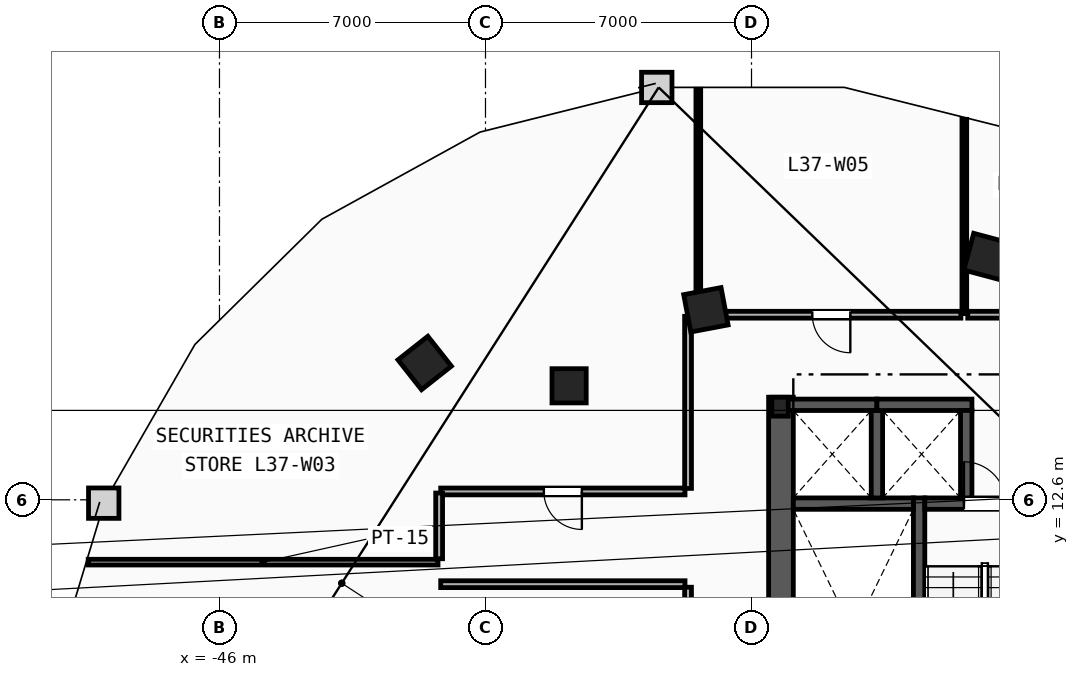
"""IFC4 building model, lengths in metres.
Left out: names, types, materials, properties, quantities, classifications, styles, units other than length and angle.
Written with IfcOpenShell. Run it as: python <this file> out.ifc"""

import sys

from ifc_helpers import new_model, si_unit, direction, frame, frame_2d, origin, origin_2d, place, context, subcontext, project, spatial, rectangle, i_section, extrude, element, fill, save


model = new_model("IFC4")
c1 = context("Model", 3, precision=1e-05, world=origin(), true_north=direction((0.0, 1.0)))
c2 = subcontext(c1, "Body", "Model", "MODEL_VIEW")
j1 = project(units=[si_unit("LENGTHUNIT", "METRE"), si_unit("PLANEANGLEUNIT", "RADIAN")], contexts=[c1])
p1 = place(None, origin())
s1 = spatial("IfcSite", under=j1, at=p1, CompositionType="ELEMENT")
p2 = place(p1, origin())
s2 = spatial("IfcBuilding", under=s1, at=p2, CompositionType="ELEMENT")
p3 = place(p2, frame((0.0, 0.0, 144.0)))
s3 = spatial("IfcBuildingStorey", under=s2, at=p3, CompositionType="ELEMENT", Elevation=144.0)
p4 = place(p3, frame((-31.25, 15.05, 0.0), z_axis=(0.0, 0.0, 1.0), x_axis=(1.0, 0.0, 0.0)))
e1 = element("IfcColumn", 1, at=p4, inside=s3, PredefinedType="COLUMN", context=c2, shape_type="SweptSolid", body=[
    extrude(i_section(OverallWidth=0.432, OverallDepth=0.498, WebThickness=0.056, FlangeThickness=0.089, FilletRadius=0.018, at=origin_2d()), origin(), (0.0, 0.0, 1.0), 3.6),
])
p5 = place(p3, frame((-36.8, 15.6, 0.0), z_axis=(0.0, 0.0, 1.0), x_axis=(1.0, 0.0, 0.0)))
e2 = element("IfcColumn", 2, at=p5, inside=s3, PredefinedType="COLUMN", context=c2, shape_type="SweptSolid", body=[
    extrude(rectangle(XDim=0.9, YDim=0.9, at=origin_2d()), origin(), (0.0, 0.0, 1.0), 3.6),
])
for number, where, z_axis, x_axis in (
    (3, (-25.8, 19.0, 0.0), (0.0, 0.0, 1.0), (-0.966, 0.259, 0.0)),
    (4, (-33.2, 17.6, 0.0), (0.0, 0.0, 1.0), (-0.983, -0.186, 0.0)),
    (5, (-40.6, 16.2, 0.0), (0.0, 0.0, 1.0), (-0.785, -0.619, 0.0)),
):
    element("IfcColumn", number, at=place(p3, frame(where, z_axis=z_axis, x_axis=x_axis)), inside=s3, PredefinedType="COLUMN", context=c2, shape_type="SweptSolid", body=[
        extrude(rectangle(XDim=1.0, YDim=1.0, at=origin_2d()), origin(), (0.0, 0.0, 1.0), 3.6),
    ])
p6 = place(p3, frame((-31.225, 1.97, 0.0), z_axis=(0.0, 0.0, 1.0), x_axis=(0.0, 1.0, 0.0)))
e6 = element("IfcWall", 6, at=p6, inside=s3, PredefinedType="SHEAR", context=c2, shape_type="SweptSolid", body=[
    extrude(rectangle(XDim=13.33, YDim=0.65, at=frame_2d((6.665, 0.0))), origin(), (0.0, 0.0, 1.0), 3.36),
])
p7 = place(p3, frame((-27.59, 1.97, 0.0), z_axis=(0.0, 0.0, 1.0), x_axis=(0.0, 1.0, 0.0)))
e7 = element("IfcWall", 7, at=p7, inside=s3, PredefinedType="SHEAR", context=c2, shape_type="SweptSolid", body=[
    extrude(rectangle(XDim=10.68, YDim=0.3, at=frame_2d((5.34, 0.0))), origin(), (0.0, 0.0, 1.0), 3.36),
])
p8 = place(p3, frame((-30.9, 12.5, 0.0), z_axis=(0.0, 0.0, 1.0), x_axis=(1.0, 0.0, 0.0)))
e8 = element("IfcWall", 8, at=p8, inside=s3, PredefinedType="SHEAR", context=c2, shape_type="SweptSolid", body=[
    extrude(rectangle(XDim=3.16, YDim=0.3, at=frame_2d((1.58, 0.0))), origin(), (0.0, 0.0, 1.0), 3.36),
])
p9 = place(p3, frame((-27.44, 12.5, 0.0), z_axis=(0.0, 0.0, 1.0), x_axis=(1.0, 0.0, 0.0)))
e9 = element("IfcWall", 9, at=p9, inside=s3, PredefinedType="SHEAR", context=c2, shape_type="SweptSolid", body=[
    extrude(rectangle(XDim=3.16, YDim=0.3, at=frame_2d((1.58, 0.0))), origin(), (0.0, 0.0, 1.0), 3.36),
])
p10 = place(p9, frame((1.03, 0.0, 0.0)))
e10 = element("IfcOpeningElement", 10, at=p10, cuts=e9, PredefinedType="OPENING", context=c2, shape_type="SweptSolid", body=[
    extrude(rectangle(XDim=1.1, YDim=2.15, at=frame_2d((0.55, 1.075))), frame((0.0, 0.16, 0.0), z_axis=(0.0, -1.0, 0.0), x_axis=(1.0, 0.0, 0.0)), (0.0, 0.0, 1.0), 0.32),
])
p11 = place(p3, frame((-31.2, 15.1, 0.0), z_axis=(0.0, 0.0, 1.0), x_axis=(1.0, 0.0, 0.0)))
e11 = element("IfcWall", 11, at=p11, inside=s3, PredefinedType="SHEAR", context=c2, shape_type="SweptSolid", body=[
    extrude(rectangle(XDim=2.5, YDim=0.3, at=frame_2d((1.25, 0.0))), origin(), (0.0, 0.0, 1.0), 3.36),
])
p12 = place(p3, frame((-28.7, 12.65, 0.0), z_axis=(0.0, 0.0, 1.0), x_axis=(0.0, 1.0, 0.0)))
e12 = element("IfcWall", 12, at=p12, inside=s3, PredefinedType="SHEAR", context=c2, shape_type="SweptSolid", body=[
    extrude(rectangle(XDim=2.3, YDim=0.3, at=frame_2d((1.15, 0.0))), origin(), (0.0, 0.0, 1.0), 3.36),
])
p13 = place(p3, frame((-28.7, 15.1, 0.0), z_axis=(0.0, 0.0, 1.0), x_axis=(1.0, 0.0, 0.0)))
e13 = element("IfcWall", 13, at=p13, inside=s3, PredefinedType="SHEAR", context=c2, shape_type="SweptSolid", body=[
    extrude(rectangle(XDim=2.5, YDim=0.3, at=frame_2d((1.25, 0.0))), origin(), (0.0, 0.0, 1.0), 3.36),
])
p14 = place(p3, frame((-26.35, 12.65, 0.0), z_axis=(0.0, 0.0, 1.0), x_axis=(0.0, 1.0, 0.0)))
e14 = element("IfcWall", 14, at=p14, inside=s3, PredefinedType="SHEAR", context=c2, shape_type="SweptSolid", body=[
    extrude(rectangle(XDim=2.3, YDim=0.3, at=frame_2d((1.15, 0.0))), origin(), (0.0, 0.0, 1.0), 3.36),
])
p15 = place(p3, frame((-49.454, 10.96, 0.0), z_axis=(0.0, 0.0, 1.0), x_axis=(1.0, 0.0, 0.0)))
e15 = element("IfcWall", 15, at=p15, inside=s3, PredefinedType="PARTITIONING", context=c2, shape_type="SweptSolid", body=[
    extrude(rectangle(XDim=9.204, YDim=0.15, at=frame_2d((4.602, 0.0))), origin(), (0.0, 0.0, 1.0), 3.36),
])
p16 = place(p3, frame((-33.4, 17.5, 0.0), z_axis=(0.0, 0.0, 1.0), x_axis=(0.0, 1.0, 0.0)))
e16 = element("IfcWall", 16, at=p16, inside=s3, PredefinedType="PARTITIONING", context=c2, shape_type="SweptSolid", body=[
    extrude(rectangle(XDim=5.902, YDim=0.125, at=frame_2d((2.951, 0.0))), origin(), (0.0, 0.0, 1.0), 3.36),
])
p17 = place(p3, frame((-26.4, 17.5, 0.0), z_axis=(0.0, 0.0, 1.0), x_axis=(0.0, 1.0, 0.0)))
e17 = element("IfcWall", 17, at=p17, inside=s3, PredefinedType="PARTITIONING", context=c2, shape_type="SweptSolid", body=[
    extrude(rectangle(XDim=5.111, YDim=0.125, at=frame_2d((2.556, 0.0))), origin(), (0.0, 0.0, 1.0), 3.36),
])
p18 = place(p3, frame((-40.178, 10.38, 0.0), z_axis=(0.0, 0.0, 1.0), x_axis=(1.0, 0.0, 0.0)))
e18 = element("IfcWall", 18, at=p18, inside=s3, PredefinedType="PARTITIONING", context=c2, shape_type="SweptSolid", body=[
    extrude(rectangle(XDim=6.428, YDim=0.18, at=frame_2d((3.214, 0.0))), origin(), (0.0, 0.0, 1.0), 3.36),
])
p19 = place(p3, frame((-33.67, 10.3, 0.0), z_axis=(0.0, 0.0, 1.0), x_axis=(0.0, -1.0, 0.0)))
e19 = element("IfcWall", 19, at=p19, inside=s3, PredefinedType="PARTITIONING", context=c2, shape_type="SweptSolid", body=[
    extrude(rectangle(XDim=1.299, YDim=0.18, at=frame_2d((0.649, 0.0))), origin(), (0.0, 0.0, 1.0), 3.36),
])
p20 = place(p3, frame((-33.75, 12.82, 0.0), z_axis=(0.0, 0.0, 1.0), x_axis=(-1.0, 0.0, 0.0)))
e20 = element("IfcWall", 20, at=p20, inside=s3, PredefinedType="PARTITIONING", context=c2, shape_type="SweptSolid", body=[
    extrude(rectangle(XDim=6.428, YDim=0.18, at=frame_2d((3.214, 0.0))), origin(), (0.0, 0.0, 1.0), 3.36),
])
p21 = place(p20, frame((2.714, 0.0, 0.0)))
e21 = element("IfcOpeningElement", 21, at=p21, cuts=e20, PredefinedType="OPENING", context=c2, shape_type="SweptSolid", body=[
    extrude(rectangle(XDim=1.0, YDim=2.15, at=frame_2d((0.5, 1.075))), frame((0.0, 0.1, 0.0), z_axis=(0.0, -1.0, 0.0), x_axis=(1.0, 0.0, 0.0)), (0.0, 0.0, 1.0), 0.2),
])
p22 = place(p3, frame((-33.67, 17.428, 0.0), z_axis=(0.0, 0.0, 1.0), x_axis=(0.0, -1.0, 0.0)))
e22 = element("IfcWall", 22, at=p22, inside=s3, PredefinedType="PARTITIONING", context=c2, shape_type="SweptSolid", body=[
    extrude(rectangle(XDim=4.529, YDim=0.18, at=frame_2d((2.264, 0.0))), origin(), (0.0, 0.0, 1.0), 3.36),
])
p23 = place(p3, frame((-40.22, 12.779, 0.0), z_axis=(0.0, 0.0, 1.0), x_axis=(0.0, -1.0, 0.0)))
e23 = element("IfcWall", 23, at=p23, inside=s3, PredefinedType="PARTITIONING", context=c2, shape_type="SweptSolid", body=[
    extrude(rectangle(XDim=1.729, YDim=0.18, at=frame_2d((0.864, 0.0))), origin(), (0.0, 0.0, 1.0), 3.36),
])
p24 = place(p3, frame((-18.342, 17.47, 0.0), z_axis=(0.0, 0.0, 1.0), x_axis=(-1.0, 0.0, 0.0)))
e24 = element("IfcWall", 24, at=p24, inside=s3, PredefinedType="PARTITIONING", context=c2, shape_type="SweptSolid", body=[
    extrude(rectangle(XDim=7.968, YDim=0.18, at=frame_2d((3.984, 0.0))), origin(), (0.0, 0.0, 1.0), 3.36),
])
p25 = place(p24, frame((3.484, 0.0, 0.0)))
e25 = element("IfcOpeningElement", 25, at=p25, cuts=e24, PredefinedType="OPENING", context=c2, shape_type="SweptSolid", body=[
    extrude(rectangle(XDim=1.0, YDim=2.15, at=frame_2d((0.5, 1.075))), frame((0.0, 0.1, 0.0), z_axis=(0.0, -1.0, 0.0), x_axis=(1.0, 0.0, 0.0)), (0.0, 0.0, 1.0), 0.2),
])
p26 = place(p3, frame((-26.49, 17.47, 0.0), z_axis=(0.0, 0.0, 1.0), x_axis=(-1.0, 0.0, 0.0)))
e26 = element("IfcWall", 26, at=p26, inside=s3, PredefinedType="PARTITIONING", context=c2, shape_type="SweptSolid", body=[
    extrude(rectangle(XDim=6.82, YDim=0.18, at=frame_2d((3.41, 0.0))), origin(), (0.0, 0.0, 1.0), 3.36),
])
p27 = place(p26, frame((2.91, 0.0, 0.0)))
e27 = element("IfcOpeningElement", 27, at=p27, cuts=e26, PredefinedType="OPENING", context=c2, shape_type="SweptSolid", body=[
    extrude(rectangle(XDim=1.0, YDim=2.15, at=frame_2d((0.5, 1.075))), frame((0.0, 0.1, 0.0), z_axis=(0.0, -1.0, 0.0), x_axis=(1.0, 0.0, 0.0)), (0.0, 0.0, 1.0), 0.2),
])
p28 = place(p10, origin())
e28 = element("IfcDoor", 28, at=p28, inside=s3, OperationType="SINGLE_SWING_LEFT", PredefinedType="DOOR", context=c2, shape_type="SweptSolid", body=[
    extrude(rectangle(XDim=1.1, YDim=2.15, at=frame_2d((0.55, 1.075))), frame((0.0, 0.025, 0.0), z_axis=(0.0, -1.0, 0.0), x_axis=(1.0, 0.0, 0.0)), (0.0, 0.0, 1.0), 0.05),
])
fill(e10, e28)
p29 = place(p27, origin())
e29 = element("IfcDoor", 29, at=p29, inside=s3, OperationType="SINGLE_SWING_LEFT", PredefinedType="DOOR", context=c2, shape_type="SweptSolid", body=[
    extrude(rectangle(XDim=1.0, YDim=2.15, at=frame_2d((0.5, 1.075))), frame((0.0, 0.025, 0.0), z_axis=(0.0, -1.0, 0.0), x_axis=(1.0, 0.0, 0.0)), (0.0, 0.0, 1.0), 0.05),
])
fill(e27, e29)
p30 = place(p21, origin())
e30 = element("IfcDoor", 30, at=p30, inside=s3, OperationType="SINGLE_SWING_LEFT", PredefinedType="DOOR", context=c2, shape_type="SweptSolid", body=[
    extrude(rectangle(XDim=1.0, YDim=2.15, at=frame_2d((0.5, 1.075))), frame((0.0, 0.025, 0.0), z_axis=(0.0, -1.0, 0.0), x_axis=(1.0, 0.0, 0.0)), (0.0, 0.0, 1.0), 0.05),
])
fill(e21, e30)
save(model, sys.argv[1])
